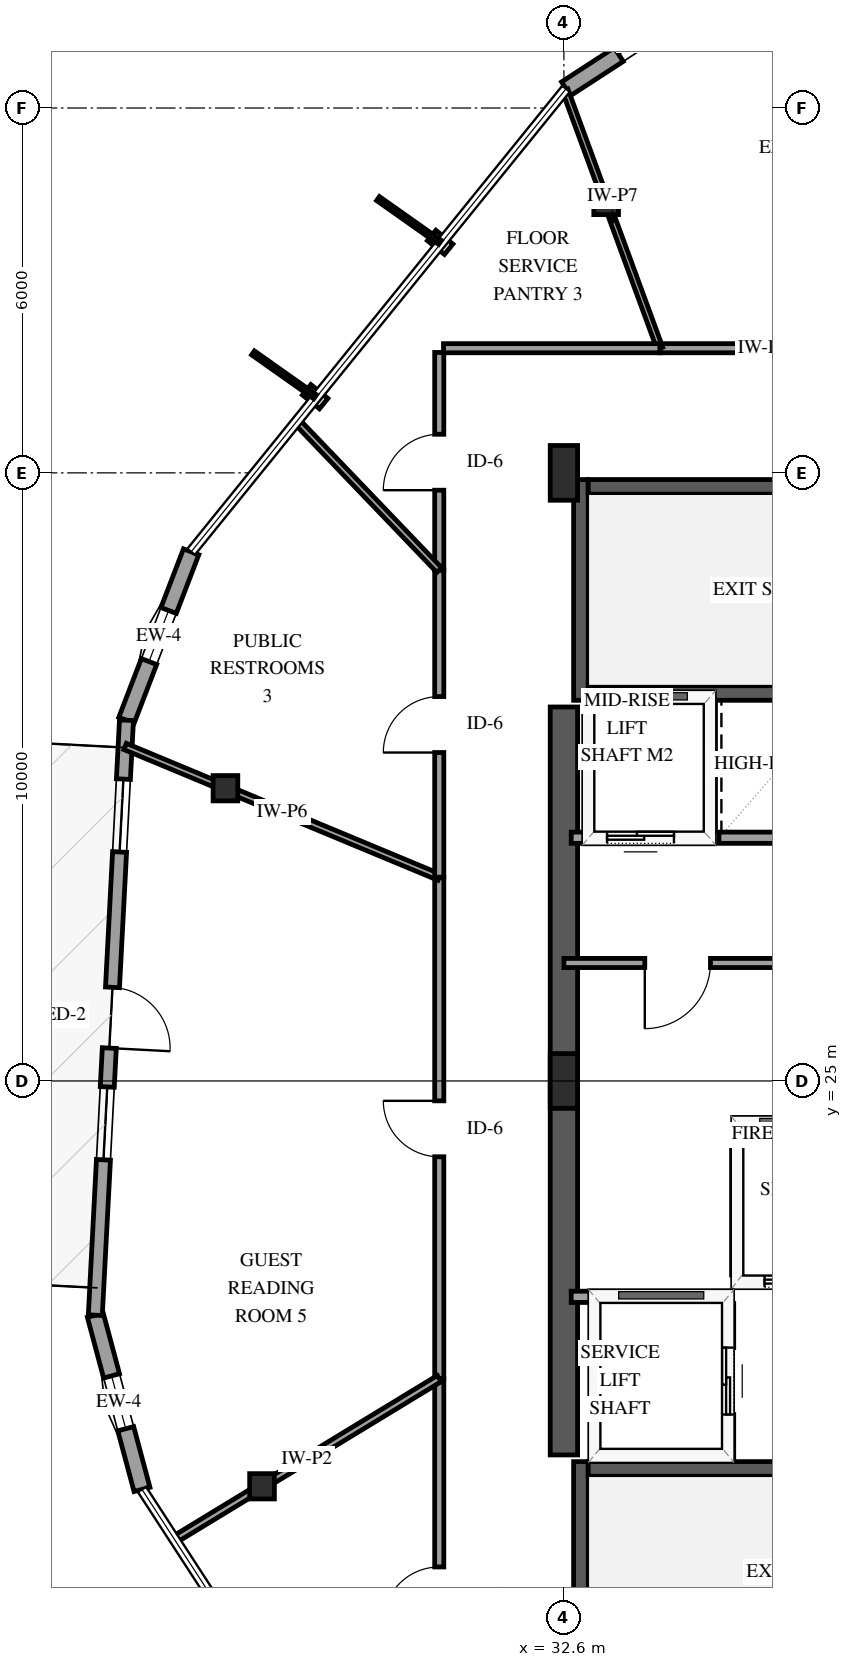
"""IFC4 building model, lengths in metres.
Left out: names, types, materials, properties, quantities, classifications, styles, units other than length and angle.
Written with IfcOpenShell. Run it as: python <this file> out.ifc"""

import sys

from ifc_helpers import new_model, si_unit, direction, frame, frame_2d, origin, origin_2d, place, context, subcontext, project, spatial, rectangle, i_section, extrude, element, fill, save


model = new_model("IFC4")
c1 = context("Model", 3, precision=1e-05, world=origin(), true_north=direction((0.0, 1.0)))
c2 = subcontext(c1, "Body", "Model", "MODEL_VIEW")
j1 = project(units=[si_unit("LENGTHUNIT", "METRE"), si_unit("PLANEANGLEUNIT", "RADIAN")], contexts=[c1])
p1 = place(None, origin())
s1 = spatial("IfcSite", under=j1, at=p1, CompositionType="ELEMENT")
p2 = place(p1, origin())
s2 = spatial("IfcBuilding", under=s1, at=p2, CompositionType="ELEMENT")
p3 = place(p2, frame((0.0, 0.0, 219.4)))
s3 = spatial("IfcBuildingStorey", under=s2, at=p3, CompositionType="ELEMENT", Elevation=219.4)
p4 = place(p3, frame((32.88, 15.11, 0.0), z_axis=(0.0, 0.0, 1.0), x_axis=(0.0, 1.0, 0.0)))
e1 = element("IfcWall", 1, at=p4, inside=s3, PredefinedType="SHEAR", context=c2, shape_type="SweptSolid", body=[
    extrude(rectangle(XDim=3.63, YDim=0.24, at=frame_2d((1.815, 0.0))), origin(), (0.0, 0.0, 1.0), 3.6),
])
p5 = place(p3, frame((33.0, 18.62, 0.0), z_axis=(0.0, 0.0, 1.0), x_axis=(1.0, 0.0, 0.0)))
e2 = element("IfcWall", 2, at=p5, inside=s3, PredefinedType="SHEAR", context=c2, shape_type="SweptSolid", body=[
    extrude(rectangle(XDim=8.0, YDim=0.24, at=frame_2d((4.0, 0.0))), origin(), (0.0, 0.0, 1.0), 3.6),
])
p6 = place(p3, frame((32.88, 31.26, 0.0), z_axis=(0.0, 0.0, 1.0), x_axis=(0.0, 1.0, 0.0)))
e3 = element("IfcWall", 3, at=p6, inside=s3, PredefinedType="SHEAR", context=c2, shape_type="SweptSolid", body=[
    extrude(rectangle(XDim=3.63, YDim=0.24, at=frame_2d((1.815, 0.0))), origin(), (0.0, 0.0, 1.0), 3.6),
])
for number, where, z_axis, x_axis in (
    (4, (33.0, 31.38, 0.0), (0.0, 0.0, 1.0), (1.0, 0.0, 0.0)),
    (5, (33.0, 34.77, 0.0), (0.0, 0.0, 1.0), (1.0, 0.0, 0.0)),
):
    element("IfcWall", number, at=place(p3, frame(where, z_axis=z_axis, x_axis=x_axis)), inside=s3, PredefinedType="SHEAR", context=c2, shape_type="SweptSolid", body=[
        extrude(rectangle(XDim=8.0, YDim=0.24, at=frame_2d((4.0, 0.0))), origin(), (0.0, 0.0, 1.0), 3.6),
    ])
p7 = place(p3, frame((32.6, 18.85, 0.0), z_axis=(0.0, 0.0, 1.0), x_axis=(0.0, 1.0, 0.0)))
e6 = element("IfcWall", 6, at=p7, inside=s3, PredefinedType="SHEAR", context=c2, shape_type="SweptSolid", body=[
    extrude(rectangle(XDim=12.3, YDim=0.45, at=frame_2d((6.15, 0.0))), origin(), (0.0, 0.0, 1.0), 3.6),
])
for number, where, z_axis, x_axis in (
    (7, (32.6, 25.0, 0.0), (0.0, 0.0, 1.0), (1.0, 0.0, 0.0)),
    (8, (32.6, 35.0, 0.0), (0.0, 0.0, 1.0), (1.0, 0.0, 0.0)),
):
    element("IfcColumn", number, at=place(p3, frame(where, z_axis=z_axis, x_axis=x_axis)), inside=s3, PredefinedType="PILASTER", context=c2, shape_type="SweptSolid", body=[
        extrude(rectangle(XDim=0.45, YDim=0.9, at=origin_2d()), origin(), (0.0, 0.0, 1.0), 3.6),
    ])
for number, where, z_axis, x_axis in (
    (9, (33.295, 39.455, 0.0), (0.0, 0.0, 1.0), (1.0, 0.0, 0.0)),
    (10, (27.034, 29.814, 0.0), (0.0, 0.0, 1.0), (1.0, 0.0, 0.0)),
    (11, (27.635, 18.334, 0.0), (0.0, 0.0, 1.0), (1.0, 0.0, 0.0)),
):
    element("IfcColumn", number, at=place(p3, frame(where, z_axis=z_axis, x_axis=x_axis)), inside=s3, PredefinedType="COLUMN", context=c2, shape_type="SweptSolid", body=[
        extrude(i_section(OverallWidth=0.406, OverallDepth=0.416, WebThickness=0.03, FlangeThickness=0.048, FilletRadius=0.038, at=origin_2d()), origin(), (0.0, 0.0, 1.0), 3.6),
    ])
p8 = place(p3, frame((35.124, 42.932, 0.0), z_axis=(0.0, 0.0, 1.0), x_axis=(-0.838674807451, -0.544632506693, 0.0)))
e12 = element("IfcWall", 12, at=p8, inside=s3, PredefinedType="SOLIDWALL", context=c2, shape_type="SweptSolid", body=[
    extrude(rectangle(XDim=2.967, YDim=0.27, at=frame_2d((1.483, 0.0))), origin(), (0.0, 0.0, 1.0), 2.679),
])
p9 = place(p8, frame((1.033, 0.0, 0.75)))
e13 = element("IfcOpeningElement", 13, at=p9, cuts=e12, PredefinedType="OPENING", context=c2, shape_type="SweptSolid", body=[
    extrude(rectangle(XDim=0.9, YDim=1.5, at=frame_2d((0.45, 0.75))), frame((0.0, 0.145, 0.0), z_axis=(0.0, -1.0, 0.0), x_axis=(1.0, 0.0, 0.0)), (0.0, 0.0, 1.0), 0.29),
])
p10 = place(p3, frame((26.47, 33.702, 0.0), z_axis=(0.0, 0.0, 1.0), x_axis=(-0.358399967348, -0.933568135384, 0.0)))
e14 = element("IfcWall", 14, at=p10, inside=s3, PredefinedType="SOLIDWALL", context=c2, shape_type="SweptSolid", body=[
    extrude(rectangle(XDim=2.967, YDim=0.27, at=frame_2d((1.483, 0.0))), origin(), (0.0, 0.0, 1.0), 2.679),
])
p11 = place(p10, frame((1.033, 0.0, 0.75)))
e15 = element("IfcOpeningElement", 15, at=p11, cuts=e14, PredefinedType="OPENING", context=c2, shape_type="SweptSolid", body=[
    extrude(rectangle(XDim=0.9, YDim=1.5, at=frame_2d((0.45, 0.75))), frame((0.0, 0.145, 0.0), z_axis=(0.0, -1.0, 0.0), x_axis=(1.0, 0.0, 0.0)), (0.0, 0.0, 1.0), 0.29),
])
p12 = place(p3, frame((24.894, 21.148, 0.0), z_axis=(0.0, 0.0, 1.0), x_axis=(0.258825213075, -0.965924173565, 0.0)))
e16 = element("IfcWall", 16, at=p12, inside=s3, PredefinedType="SOLIDWALL", context=c2, shape_type="SweptSolid", body=[
    extrude(rectangle(XDim=2.967, YDim=0.27, at=frame_2d((1.483, 0.0))), origin(), (0.0, 0.0, 1.0), 2.679),
])
p13 = place(p12, frame((1.033, 0.0, 0.75)))
e17 = element("IfcOpeningElement", 17, at=p13, cuts=e16, PredefinedType="OPENING", context=c2, shape_type="SweptSolid", body=[
    extrude(rectangle(XDim=0.9, YDim=1.5, at=frame_2d((0.45, 0.75))), frame((0.0, 0.145, 0.0), z_axis=(0.0, -1.0, 0.0), x_axis=(1.0, 0.0, 0.0)), (0.0, 0.0, 1.0), 0.29),
])
p14 = place(p3, frame((25.406, 30.932, 0.0), z_axis=(0.0, 0.0, 1.0), x_axis=(-0.052328646258, -0.998629917828, 0.0)))
e18 = element("IfcWall", 18, at=p14, inside=s3, PredefinedType="SOLIDWALL", context=c2, shape_type="SweptSolid", body=[
    extrude(rectangle(XDim=9.798, YDim=0.23, at=frame_2d((4.899, 0.0))), origin(), (0.0, 0.0, 1.0), 2.679),
])
p15 = place(p14, frame((4.399, 0.0, 0.0)))
e19 = element("IfcOpeningElement", 19, at=p15, cuts=e18, PredefinedType="OPENING", context=c2, shape_type="SweptSolid", body=[
    extrude(rectangle(XDim=1.0, YDim=2.15, at=frame_2d((0.5, 1.075))), frame((0.0, 0.125, 0.0), z_axis=(0.0, -1.0, 0.0), x_axis=(1.0, 0.0, 0.0)), (0.0, 0.0, 1.0), 0.25),
])
p16 = place(p14, frame((0.97, 0.0, 0.72)))
e20 = element("IfcOpeningElement", 20, at=p16, cuts=e18, PredefinedType="OPENING", context=c2, shape_type="SweptSolid", body=[
    extrude(rectangle(XDim=1.2, YDim=1.6, at=frame_2d((0.6, 0.8))), frame((0.0, 0.125, 0.0), z_axis=(0.0, -1.0, 0.0), x_axis=(1.0, 0.0, 0.0)), (0.0, 0.0, 1.0), 0.25),
])
p17 = place(p14, frame((6.039, 0.0, 0.72)))
e21 = element("IfcOpeningElement", 21, at=p17, cuts=e18, PredefinedType="OPENING", context=c2, shape_type="SweptSolid", body=[
    extrude(rectangle(XDim=1.2, YDim=1.6, at=frame_2d((0.6, 0.8))), frame((0.0, 0.125, 0.0), z_axis=(0.0, -1.0, 0.0), x_axis=(1.0, 0.0, 0.0)), (0.0, 0.0, 1.0), 0.25),
])
p18 = place(p3, frame((35.45, 21.7, 0.0), z_axis=(0.0, 0.0, 1.0), x_axis=(1.0, 0.0, 0.0)))
e22 = element("IfcWall", 22, at=p18, inside=s3, PredefinedType="SOLIDWALL", context=c2, shape_type="SweptSolid", body=[
    extrude(rectangle(XDim=2.0, YDim=0.185, at=frame_2d((1.0, 0.0))), origin(), (0.0, 0.0, 1.0), 3.3),
])
p19 = place(p18, frame((0.45, 0.0, 0.0)))
e23 = element("IfcOpeningElement", 23, at=p19, cuts=e22, PredefinedType="OPENING", context=c2, shape_type="SweptSolid", body=[
    extrude(rectangle(XDim=1.1, YDim=2.15, at=frame_2d((0.55, 1.075))), frame((0.0, 0.103, 0.0), z_axis=(0.0, -1.0, 0.0), x_axis=(1.0, 0.0, 0.0)), (0.0, 0.0, 1.0), 0.205),
])
p20 = place(p3, frame((35.45, 24.3, 0.0), z_axis=(0.0, 0.0, 1.0), x_axis=(1.0, 0.0, 0.0)))
e24 = element("IfcWall", 24, at=p20, inside=s3, PredefinedType="SOLIDWALL", context=c2, shape_type="SweptSolid", body=[
    extrude(rectangle(XDim=2.0, YDim=0.185, at=frame_2d((1.0, 0.0))), origin(), (0.0, 0.0, 1.0), 3.3),
])
p21 = place(p3, frame((35.45, 21.81, 0.0), z_axis=(0.0, 0.0, 1.0), x_axis=(0.0, 1.0, 0.0)))
e25 = element("IfcWall", 25, at=p21, inside=s3, PredefinedType="SOLIDWALL", context=c2, shape_type="SweptSolid", body=[
    extrude(rectangle(XDim=2.38, YDim=0.185, at=frame_2d((1.19, 0.0))), origin(), (0.0, 0.0, 1.0), 3.3),
])
p22 = place(p3, frame((32.72, 21.45, 0.0), z_axis=(0.0, 0.0, 1.0), x_axis=(1.0, 0.0, 0.0)))
e26 = element("IfcWall", 26, at=p22, inside=s3, PredefinedType="SOLIDWALL", context=c2, shape_type="SweptSolid", body=[
    extrude(rectangle(XDim=2.58, YDim=0.185, at=frame_2d((1.29, 0.0))), origin(), (0.0, 0.0, 1.0), 3.3),
])
p23 = place(p3, frame((35.3, 18.79, 0.0), z_axis=(0.0, 0.0, 1.0), x_axis=(0.0, 1.0, 0.0)))
e27 = element("IfcWall", 27, at=p23, inside=s3, PredefinedType="SOLIDWALL", context=c2, shape_type="SweptSolid", body=[
    extrude(rectangle(XDim=2.55, YDim=0.185, at=frame_2d((1.275, 0.0))), origin(), (0.0, 0.0, 1.0), 3.3),
])
p24 = place(p23, frame((0.725, 0.0, 0.0)))
e28 = element("IfcOpeningElement", 28, at=p24, cuts=e27, PredefinedType="OPENING", context=c2, shape_type="SweptSolid", body=[
    extrude(rectangle(XDim=1.1, YDim=2.15, at=frame_2d((0.55, 1.075))), frame((0.0, 0.103, 0.0), z_axis=(0.0, -1.0, 0.0), x_axis=(1.0, 0.0, 0.0)), (0.0, 0.0, 1.0), 0.205),
])
p25 = place(p3, frame((32.72, 29.0, 0.0), z_axis=(0.0, 0.0, 1.0), x_axis=(1.0, 0.0, 0.0)))
e29 = element("IfcWall", 29, at=p25, inside=s3, PredefinedType="SOLIDWALL", context=c2, shape_type="SweptSolid", body=[
    extrude(rectangle(XDim=2.28, YDim=0.185, at=frame_2d((1.14, 0.0))), origin(), (0.0, 0.0, 1.0), 3.3),
])
p26 = place(p25, frame((0.59, 0.0, 0.0)))
e30 = element("IfcOpeningElement", 30, at=p26, cuts=e29, PredefinedType="OPENING", context=c2, shape_type="SweptSolid", body=[
    extrude(rectangle(XDim=1.1, YDim=2.15, at=frame_2d((0.55, 1.075))), frame((0.0, 0.103, 0.0), z_axis=(0.0, -1.0, 0.0), x_axis=(1.0, 0.0, 0.0)), (0.0, 0.0, 1.0), 0.205),
])
p27 = place(p3, frame((35.0, 29.11, 0.0), z_axis=(0.0, 0.0, 1.0), x_axis=(0.0, 1.0, 0.0)))
e31 = element("IfcWall", 31, at=p27, inside=s3, PredefinedType="SOLIDWALL", context=c2, shape_type="SweptSolid", body=[
    extrude(rectangle(XDim=2.1, YDim=0.185, at=frame_2d((1.05, 0.0))), origin(), (0.0, 0.0, 1.0), 3.3),
])
p28 = place(p3, frame((35.15, 29.0, 0.0), z_axis=(0.0, 0.0, 1.0), x_axis=(1.0, 0.0, 0.0)))
e32 = element("IfcWall", 32, at=p28, inside=s3, PredefinedType="SOLIDWALL", context=c2, shape_type="SweptSolid", body=[
    extrude(rectangle(XDim=2.0, YDim=0.185, at=frame_2d((1.0, 0.0))), origin(), (0.0, 0.0, 1.0), 3.3),
])
p29 = place(p3, frame((30.55, 20.106, 0.0), z_axis=(0.0, 0.0, 1.0), x_axis=(0.0, 1.0, 0.0)))
e33 = element("IfcWall", 33, at=p29, inside=s3, PredefinedType="PARTITIONING", context=c2, shape_type="SweptSolid", body=[
    extrude(rectangle(XDim=8.245, YDim=0.15, at=frame_2d((4.123, 0.0))), origin(), (0.0, 0.0, 1.0), 3.3),
])
p30 = place(p29, frame((3.647, 0.0, 0.0)))
e34 = element("IfcOpeningElement", 34, at=p30, cuts=e33, PredefinedType="OPENING", context=c2, shape_type="SweptSolid", body=[
    extrude(rectangle(XDim=0.92, YDim=2.12, at=frame_2d((0.46, 1.06))), frame((0.0, 0.085, 0.0), z_axis=(0.0, -1.0, 0.0), x_axis=(1.0, 0.0, 0.0)), (0.0, 0.0, 1.0), 0.17),
])
p31 = place(p3, frame((30.55, 13.02, 0.0), z_axis=(0.0, 0.0, 1.0), x_axis=(0.0, 1.0, 0.0)))
e35 = element("IfcWall", 35, at=p31, inside=s3, PredefinedType="PARTITIONING", context=c2, shape_type="SweptSolid", body=[
    extrude(rectangle(XDim=7.086, YDim=0.15, at=frame_2d((3.543, 0.0))), origin(), (0.0, 0.0, 1.0), 3.3),
])
p32 = place(p31, frame((3.068, 0.0, 0.0)))
e36 = element("IfcOpeningElement", 36, at=p32, cuts=e35, PredefinedType="OPENING", context=c2, shape_type="SweptSolid", body=[
    extrude(rectangle(XDim=0.92, YDim=2.12, at=frame_2d((0.46, 1.06))), frame((0.0, 0.085, 0.0), z_axis=(0.0, -1.0, 0.0), x_axis=(1.0, 0.0, 0.0)), (0.0, 0.0, 1.0), 0.17),
])
p33 = place(p3, frame((34.178, 37.05, 0.0), z_axis=(0.0, 0.0, 1.0), x_axis=(1.0, 0.0, 0.0)))
e37 = element("IfcWall", 37, at=p33, inside=s3, PredefinedType="PARTITIONING", context=c2, shape_type="SweptSolid", body=[
    extrude(rectangle(XDim=6.952, YDim=0.15, at=frame_2d((3.476, 0.0))), origin(), (0.0, 0.0, 1.0), 3.3),
])
p34 = place(p3, frame((30.55, 28.351, 0.0), z_axis=(0.0, 0.0, 1.0), x_axis=(-0.923242069528, 0.384218793207, 0.0)))
e38 = element("IfcWall", 38, at=p34, inside=s3, PredefinedType="PARTITIONING", context=c2, shape_type="SweptSolid", body=[
    extrude(rectangle(XDim=5.595, YDim=0.11, at=frame_2d((2.798, 0.0))), origin(), (0.0, 0.0, 1.0), 3.3),
])
p35 = place(p3, frame((30.55, 20.106, 0.0), z_axis=(0.0, 0.0, 1.0), x_axis=(-0.854485244393, -0.519475665566, 0.0)))
e39 = element("IfcWall", 39, at=p35, inside=s3, PredefinedType="PARTITIONING", context=c2, shape_type="SweptSolid", body=[
    extrude(rectangle(XDim=5.095, YDim=0.12, at=frame_2d((2.548, 0.0))), origin(), (0.0, 0.0, 1.0), 2.678),
])
p36 = place(p3, frame((30.55, 28.351, 0.0), z_axis=(0.0, 0.0, 1.0), x_axis=(0.0, 1.0, 0.0)))
e40 = element("IfcWall", 40, at=p36, inside=s3, PredefinedType="PARTITIONING", context=c2, shape_type="SweptSolid", body=[
    extrude(rectangle(XDim=5.05, YDim=0.15, at=frame_2d((2.525, 0.0))), origin(), (0.0, 0.0, 1.0), 3.3),
])
p37 = place(p36, frame((2.05, 0.0, 0.0)))
e41 = element("IfcOpeningElement", 41, at=p37, cuts=e40, PredefinedType="OPENING", context=c2, shape_type="SweptSolid", body=[
    extrude(rectangle(XDim=0.92, YDim=2.12, at=frame_2d((0.46, 1.06))), frame((0.0, 0.085, 0.0), z_axis=(0.0, -1.0, 0.0), x_axis=(1.0, 0.0, 0.0)), (0.0, 0.0, 1.0), 0.17),
])
p38 = place(p3, frame((34.178, 37.05, 0.0), z_axis=(0.0, 0.0, 1.0), x_axis=(-0.344697105997, 0.938713963419, 0.0)))
e42 = element("IfcWall", 42, at=p38, inside=s3, PredefinedType="PARTITIONING", context=c2, shape_type="SweptSolid", body=[
    extrude(rectangle(XDim=4.523, YDim=0.1, at=frame_2d((2.261, 0.0))), origin(), (0.0, 0.0, 1.0), 2.595),
])
p39 = place(p3, frame((36.34, 26.94, 0.0), z_axis=(0.0, 0.0, 1.0), x_axis=(-1.0, 0.0, 0.0)))
e43 = element("IfcWall", 43, at=p39, inside=s3, PredefinedType="PARTITIONING", context=c2, shape_type="SweptSolid", body=[
    extrude(rectangle(XDim=3.74, YDim=0.15, at=frame_2d((1.87, 0.0))), origin(), (0.0, 0.0, 1.0), 3.3),
])
p40 = place(p39, frame((1.33, 0.0, 0.0)))
e44 = element("IfcOpeningElement", 44, at=p40, cuts=e43, PredefinedType="OPENING", context=c2, shape_type="SweptSolid", body=[
    extrude(rectangle(XDim=1.08, YDim=2.15, at=frame_2d((0.54, 1.075))), frame((0.0, 0.085, 0.0), z_axis=(0.0, -1.0, 0.0), x_axis=(1.0, 0.0, 0.0)), (0.0, 0.0, 1.0), 0.17),
])
p41 = place(p3, frame((30.55, 33.401, 0.0), z_axis=(0.0, 0.0, 1.0), x_axis=(0.0, 1.0, 0.0)))
e45 = element("IfcWall", 45, at=p41, inside=s3, PredefinedType="PARTITIONING", context=c2, shape_type="SweptSolid", body=[
    extrude(rectangle(XDim=3.579, YDim=0.15, at=frame_2d((1.79, 0.0))), origin(), (0.0, 0.0, 1.0), 3.3),
])
p42 = place(p41, frame((1.314, 0.0, 0.0)))
e46 = element("IfcOpeningElement", 46, at=p42, cuts=e45, PredefinedType="OPENING", context=c2, shape_type="SweptSolid", body=[
    extrude(rectangle(XDim=0.92, YDim=2.12, at=frame_2d((0.46, 1.06))), frame((0.0, 0.085, 0.0), z_axis=(0.0, -1.0, 0.0), x_axis=(1.0, 0.0, 0.0)), (0.0, 0.0, 1.0), 0.17),
])
p43 = place(p3, frame((30.62, 37.05, 0.0), z_axis=(0.0, 0.0, 1.0), x_axis=(1.0, 0.0, 0.0)))
e47 = element("IfcWall", 47, at=p43, inside=s3, PredefinedType="PARTITIONING", context=c2, shape_type="SweptSolid", body=[
    extrude(rectangle(XDim=3.558, YDim=0.15, at=frame_2d((1.779, 0.0))), origin(), (0.0, 0.0, 1.0), 3.3),
])
p44 = place(p3, frame((30.55, 33.401, 0.0), z_axis=(0.0, 0.0, 1.0), x_axis=(-0.691885015521, 0.722007704458, 0.0)))
e48 = element("IfcWall", 48, at=p44, inside=s3, PredefinedType="PARTITIONING", context=c2, shape_type="SweptSolid", body=[
    extrude(rectangle(XDim=3.388, YDim=0.11, at=frame_2d((1.694, 0.0))), origin(), (0.0, 0.0, 1.0), 3.3),
])
p45 = place(p9, origin())
e49 = element("IfcWindow", 49, at=p45, inside=s3, PartitioningType="SINGLE_PANEL", PredefinedType="WINDOW", context=c2, shape_type="SweptSolid", body=[
    extrude(rectangle(XDim=0.9, YDim=1.5, at=frame_2d((0.45, 0.75))), frame((0.0, 0.03, 0.0), z_axis=(0.0, -1.0, 0.0), x_axis=(1.0, 0.0, 0.0)), (0.0, 0.0, 1.0), 0.06),
])
fill(e13, e49)
p46 = place(p11, origin())
e50 = element("IfcWindow", 50, at=p46, inside=s3, PartitioningType="SINGLE_PANEL", PredefinedType="WINDOW", context=c2, shape_type="SweptSolid", body=[
    extrude(rectangle(XDim=0.9, YDim=1.5, at=frame_2d((0.45, 0.75))), frame((0.0, 0.03, 0.0), z_axis=(0.0, -1.0, 0.0), x_axis=(1.0, 0.0, 0.0)), (0.0, 0.0, 1.0), 0.06),
])
fill(e15, e50)
p47 = place(p13, origin())
e51 = element("IfcWindow", 51, at=p47, inside=s3, PartitioningType="SINGLE_PANEL", PredefinedType="WINDOW", context=c2, shape_type="SweptSolid", body=[
    extrude(rectangle(XDim=0.9, YDim=1.5, at=frame_2d((0.45, 0.75))), frame((0.0, 0.03, 0.0), z_axis=(0.0, -1.0, 0.0), x_axis=(1.0, 0.0, 0.0)), (0.0, 0.0, 1.0), 0.06),
])
fill(e17, e51)
p48 = place(p15, origin())
e52 = element("IfcDoor", 52, at=p48, inside=s3, OperationType="SINGLE_SWING_RIGHT", PredefinedType="DOOR", context=c2, shape_type="SweptSolid", body=[
    extrude(rectangle(XDim=1.0, YDim=2.15, at=frame_2d((0.5, 1.075))), frame((0.0, 0.025, 0.0), z_axis=(0.0, -1.0, 0.0), x_axis=(1.0, 0.0, 0.0)), (0.0, 0.0, 1.0), 0.05),
])
fill(e19, e52)
p49 = place(p16, origin())
e53 = element("IfcWindow", 53, at=p49, inside=s3, PartitioningType="SINGLE_PANEL", PredefinedType="WINDOW", context=c2, shape_type="SweptSolid", body=[
    extrude(rectangle(XDim=1.2, YDim=1.6, at=frame_2d((0.6, 0.8))), frame((0.0, 0.03, 0.0), z_axis=(0.0, -1.0, 0.0), x_axis=(1.0, 0.0, 0.0)), (0.0, 0.0, 1.0), 0.06),
])
fill(e20, e53)
p50 = place(p17, origin())
e54 = element("IfcWindow", 54, at=p50, inside=s3, PartitioningType="SINGLE_PANEL", PredefinedType="WINDOW", context=c2, shape_type="SweptSolid", body=[
    extrude(rectangle(XDim=1.2, YDim=1.6, at=frame_2d((0.6, 0.8))), frame((0.0, 0.03, 0.0), z_axis=(0.0, -1.0, 0.0), x_axis=(1.0, 0.0, 0.0)), (0.0, 0.0, 1.0), 0.06),
])
fill(e21, e54)
p51 = place(p19, origin())
e55 = element("IfcDoor", 55, at=p51, inside=s3, OperationType="SLIDING_TO_LEFT", PredefinedType="DOOR", context=c2, shape_type="SweptSolid", body=[
    extrude(rectangle(XDim=1.1, YDim=2.15, at=frame_2d((0.55, 1.075))), frame((0.0, 0.025, 0.0), z_axis=(0.0, -1.0, 0.0), x_axis=(1.0, 0.0, 0.0)), (0.0, 0.0, 1.0), 0.05),
])
fill(e23, e55)
p52 = place(p24, origin())
e56 = element("IfcDoor", 56, at=p52, inside=s3, OperationType="SLIDING_TO_LEFT", PredefinedType="DOOR", context=c2, shape_type="SweptSolid", body=[
    extrude(rectangle(XDim=1.1, YDim=2.15, at=frame_2d((0.55, 1.075))), frame((0.0, 0.025, 0.0), z_axis=(0.0, -1.0, 0.0), x_axis=(1.0, 0.0, 0.0)), (0.0, 0.0, 1.0), 0.05),
])
fill(e28, e56)
p53 = place(p26, origin())
e57 = element("IfcDoor", 57, at=p53, inside=s3, OperationType="SLIDING_TO_LEFT", PredefinedType="DOOR", context=c2, shape_type="SweptSolid", body=[
    extrude(rectangle(XDim=1.1, YDim=2.15, at=frame_2d((0.55, 1.075))), frame((0.0, 0.025, 0.0), z_axis=(0.0, -1.0, 0.0), x_axis=(1.0, 0.0, 0.0)), (0.0, 0.0, 1.0), 0.05),
])
fill(e30, e57)
p54 = place(p30, origin())
e58 = element("IfcDoor", 58, at=p54, inside=s3, OperationType="SINGLE_SWING_RIGHT", PredefinedType="DOOR", context=c2, shape_type="SweptSolid", body=[
    extrude(rectangle(XDim=0.92, YDim=2.12, at=frame_2d((0.46, 1.06))), frame((0.0, 0.025, 0.0), z_axis=(0.0, -1.0, 0.0), x_axis=(1.0, 0.0, 0.0)), (0.0, 0.0, 1.0), 0.05),
])
fill(e34, e58)
p55 = place(p32, origin())
e59 = element("IfcDoor", 59, at=p55, inside=s3, OperationType="SINGLE_SWING_LEFT", PredefinedType="DOOR", context=c2, shape_type="SweptSolid", body=[
    extrude(rectangle(XDim=0.92, YDim=2.12, at=frame_2d((0.46, 1.06))), frame((0.0, 0.025, 0.0), z_axis=(0.0, -1.0, 0.0), x_axis=(1.0, 0.0, 0.0)), (0.0, 0.0, 1.0), 0.05),
])
fill(e36, e59)
p56 = place(p37, origin())
e60 = element("IfcDoor", 60, at=p56, inside=s3, OperationType="SINGLE_SWING_LEFT", PredefinedType="DOOR", context=c2, shape_type="SweptSolid", body=[
    extrude(rectangle(XDim=0.92, YDim=2.12, at=frame_2d((0.46, 1.06))), frame((0.0, 0.025, 0.0), z_axis=(0.0, -1.0, 0.0), x_axis=(1.0, 0.0, 0.0)), (0.0, 0.0, 1.0), 0.05),
])
fill(e41, e60)
p57 = place(p40, origin())
e61 = element("IfcDoor", 61, at=p57, inside=s3, OperationType="SINGLE_SWING_RIGHT", PredefinedType="DOOR", context=c2, shape_type="SweptSolid", body=[
    extrude(rectangle(XDim=1.08, YDim=2.15, at=frame_2d((0.54, 1.075))), frame((0.0, 0.025, 0.0), z_axis=(0.0, -1.0, 0.0), x_axis=(1.0, 0.0, 0.0)), (0.0, 0.0, 1.0), 0.05),
])
fill(e44, e61)
p58 = place(p42, origin())
e62 = element("IfcDoor", 62, at=p58, inside=s3, OperationType="SINGLE_SWING_LEFT", PredefinedType="DOOR", context=c2, shape_type="SweptSolid", body=[
    extrude(rectangle(XDim=0.92, YDim=2.12, at=frame_2d((0.46, 1.06))), frame((0.0, 0.025, 0.0), z_axis=(0.0, -1.0, 0.0), x_axis=(1.0, 0.0, 0.0)), (0.0, 0.0, 1.0), 0.05),
])
fill(e46, e62)
save(model, sys.argv[1])
